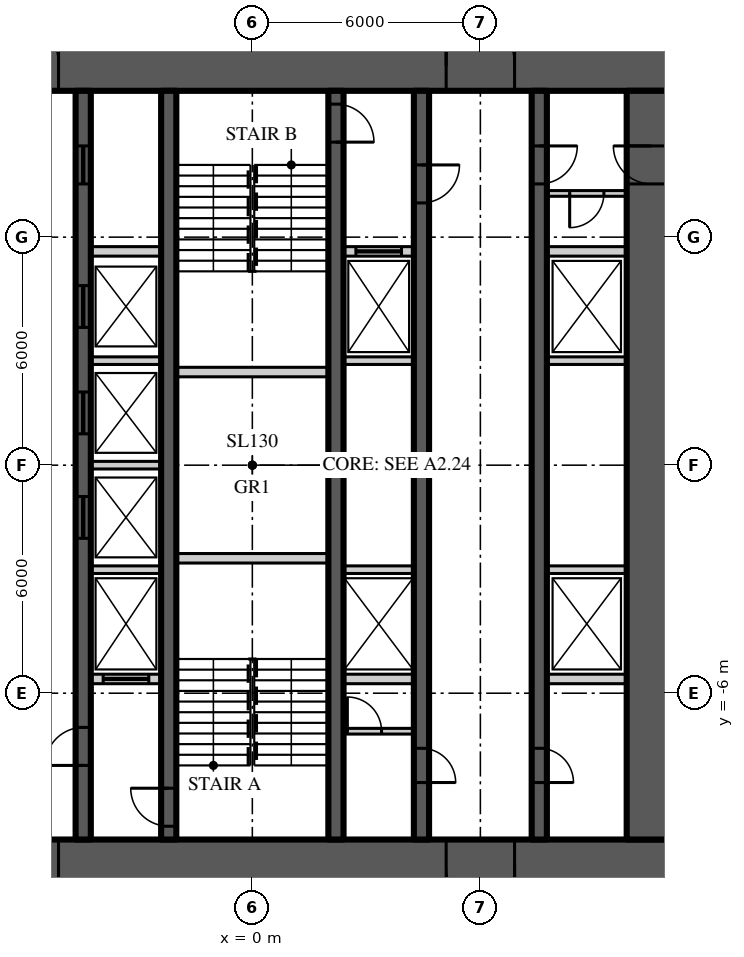
"""IFC4 building model, lengths in metres.
Left out: names, types, materials, properties, quantities, classifications, styles, units other than length and angle.
Written with IfcOpenShell. Run it as: python <this file> out.ifc"""

import sys

from ifc_helpers import new_model, si_unit, direction, frame, frame_2d, origin, place, context, subcontext, project, spatial, rectangle, extrude, element, fill, save


model = new_model("IFC4")
c1 = context("Model", 3, precision=1e-05, world=origin(), true_north=direction((0.0, 1.0)))
c2 = subcontext(c1, "Body", "Model", "MODEL_VIEW")
j1 = project(units=[si_unit("LENGTHUNIT", "METRE"), si_unit("PLANEANGLEUNIT", "RADIAN")], contexts=[c1])
p1 = place(None, origin())
s1 = spatial("IfcSite", under=j1, at=p1, CompositionType="ELEMENT")
p2 = place(p1, origin())
s2 = spatial("IfcBuilding", under=s1, at=p2, CompositionType="ELEMENT")
p3 = place(p2, frame((0.0, 0.0, 186.6)))
s3 = spatial("IfcBuildingStorey", under=s2, at=p3, CompositionType="ELEMENT", Elevation=186.6)
p4 = place(p3, frame((-11.15, 10.5, 0.0), z_axis=(0.0, 0.0, 1.0), x_axis=(1.0, 0.0, 0.0)))
e1 = element("IfcWall", 1, at=p4, inside=s3, PredefinedType="SHEAR", context=c2, shape_type="SweptSolid", body=[
    extrude(rectangle(XDim=22.3, YDim=1.3, at=frame_2d((11.15, 0.0))), origin(), (0.0, 0.0, 1.0), 3.9),
])
p5 = place(p4, frame((4.25, 0.0, 0.0)))
e2 = element("IfcOpeningElement", 2, at=p5, cuts=e1, PredefinedType="OPENING", context=c2, shape_type="SweptSolid", body=[
    extrude(rectangle(XDim=1.8, YDim=2.2, at=frame_2d((0.9, 1.1))), frame((0.0, 0.66, 0.0), z_axis=(0.0, -1.0, 0.0), x_axis=(1.0, 0.0, 0.0)), (0.0, 0.0, 1.0), 1.32),
])
p6 = place(p4, frame((16.25, 0.0, 0.0)))
e3 = element("IfcOpeningElement", 3, at=p6, cuts=e1, PredefinedType="OPENING", context=c2, shape_type="SweptSolid", body=[
    extrude(rectangle(XDim=1.8, YDim=2.2, at=frame_2d((0.9, 1.1))), frame((0.0, 0.66, 0.0), z_axis=(0.0, -1.0, 0.0), x_axis=(1.0, 0.0, 0.0)), (0.0, 0.0, 1.0), 1.32),
])
p7 = place(p3, frame((11.15, -10.5, 0.0), z_axis=(0.0, 0.0, 1.0), x_axis=(-1.0, 0.0, 0.0)))
e4 = element("IfcWall", 4, at=p7, inside=s3, PredefinedType="SHEAR", context=c2, shape_type="SweptSolid", body=[
    extrude(rectangle(XDim=22.3, YDim=1.3, at=frame_2d((11.15, 0.0))), origin(), (0.0, 0.0, 1.0), 3.9),
])
p8 = place(p7, frame((16.25, 0.0, 0.0)))
e5 = element("IfcOpeningElement", 5, at=p8, cuts=e4, PredefinedType="OPENING", context=c2, shape_type="SweptSolid", body=[
    extrude(rectangle(XDim=1.8, YDim=2.2, at=frame_2d((0.9, 1.1))), frame((0.0, 0.66, 0.0), z_axis=(0.0, -1.0, 0.0), x_axis=(1.0, 0.0, 0.0)), (0.0, 0.0, 1.0), 1.32),
])
p9 = place(p7, frame((4.25, 0.0, 0.0)))
e6 = element("IfcOpeningElement", 6, at=p9, cuts=e4, PredefinedType="OPENING", context=c2, shape_type="SweptSolid", body=[
    extrude(rectangle(XDim=1.8, YDim=2.2, at=frame_2d((0.9, 1.1))), frame((0.0, 0.66, 0.0), z_axis=(0.0, -1.0, 0.0), x_axis=(1.0, 0.0, 0.0)), (0.0, 0.0, 1.0), 1.32),
])
p10 = place(p3, frame((10.5, -9.85, 0.0), z_axis=(0.0, 0.0, 1.0), x_axis=(0.0, 1.0, 0.0)))
e7 = element("IfcWall", 7, at=p10, inside=s3, PredefinedType="SHEAR", context=c2, shape_type="SweptSolid", body=[
    extrude(rectangle(XDim=19.7, YDim=1.3, at=frame_2d((9.85, 0.0))), origin(), (0.0, 0.0, 1.0), 3.9),
])
p11 = place(p10, frame((17.25, 0.0, 0.0)))
e8 = element("IfcOpeningElement", 8, at=p11, cuts=e7, PredefinedType="OPENING", context=c2, shape_type="SweptSolid", body=[
    extrude(rectangle(XDim=1.0, YDim=2.2, at=frame_2d((0.5, 1.1))), frame((0.0, 0.66, 0.0), z_axis=(0.0, -1.0, 0.0), x_axis=(1.0, 0.0, 0.0)), (0.0, 0.0, 1.0), 1.32),
])
p12 = place(p3, frame((7.55, 9.85, 0.0), z_axis=(0.0, 0.0, 1.0), x_axis=(0.0, -1.0, 0.0)))
e9 = element("IfcWall", 9, at=p12, inside=s3, PredefinedType="SHEAR", context=c2, shape_type="SweptSolid", body=[
    extrude(rectangle(XDim=19.7, YDim=0.4, at=frame_2d((9.85, 0.0))), origin(), (0.0, 0.0, 1.0), 3.9),
])
p13 = place(p12, frame((1.45, 0.0, 0.0)))
e10 = element("IfcOpeningElement", 10, at=p13, cuts=e9, PredefinedType="OPENING", context=c2, shape_type="SweptSolid", body=[
    extrude(rectangle(XDim=1.0, YDim=2.2, at=frame_2d((0.5, 1.1))), frame((0.0, 0.21, 0.0), z_axis=(0.0, -1.0, 0.0), x_axis=(1.0, 0.0, 0.0)), (0.0, 0.0, 1.0), 0.42),
])
p14 = place(p12, frame((17.3, 0.0, 0.0)))
e11 = element("IfcOpeningElement", 11, at=p14, cuts=e9, PredefinedType="OPENING", context=c2, shape_type="SweptSolid", body=[
    extrude(rectangle(XDim=0.9, YDim=2.1, at=frame_2d((0.45, 1.05))), frame((0.0, 0.21, 0.0), z_axis=(0.0, -1.0, 0.0), x_axis=(1.0, 0.0, 0.0)), (0.0, 0.0, 1.0), 0.42),
])
p15 = place(p3, frame((-4.45, -9.85, 0.0), z_axis=(0.0, 0.0, 1.0), x_axis=(0.0, 1.0, 0.0)))
e12 = element("IfcWall", 12, at=p15, inside=s3, PredefinedType="SHEAR", context=c2, shape_type="SweptSolid", body=[
    extrude(rectangle(XDim=19.7, YDim=0.4, at=frame_2d((9.85, 0.0))), origin(), (0.0, 0.0, 1.0), 3.9),
])
p16 = place(p15, frame((1.95, 0.0, 0.0)))
e13 = element("IfcOpeningElement", 13, at=p16, cuts=e12, PredefinedType="OPENING", context=c2, shape_type="SweptSolid", body=[
    extrude(rectangle(XDim=1.0, YDim=2.2, at=frame_2d((0.5, 1.1))), frame((0.0, 0.21, 0.0), z_axis=(0.0, -1.0, 0.0), x_axis=(1.0, 0.0, 0.0)), (0.0, 0.0, 1.0), 0.42),
])
p17 = place(p15, frame((17.25, 0.0, 0.0)))
e14 = element("IfcOpeningElement", 14, at=p17, cuts=e12, PredefinedType="OPENING", context=c2, shape_type="SweptSolid", body=[
    extrude(rectangle(XDim=1.0, YDim=2.1, at=frame_2d((0.5, 1.05))), frame((0.0, 0.21, 0.0), z_axis=(0.0, -1.0, 0.0), x_axis=(1.0, 0.0, 0.0)), (0.0, 0.0, 1.0), 0.42),
])
p18 = place(p15, frame((7.925, 0.0, 0.0)))
e15 = element("IfcOpeningElement", 15, at=p18, cuts=e12, PredefinedType="OPENING", context=c2, shape_type="SweptSolid", body=[
    extrude(rectangle(XDim=1.1, YDim=2.2, at=frame_2d((0.55, 1.1))), frame((0.0, 0.21, 0.0), z_axis=(0.0, -1.0, 0.0), x_axis=(1.0, 0.0, 0.0)), (0.0, 0.0, 1.0), 0.42),
])
p19 = place(p15, frame((10.675, 0.0, 0.0)))
e16 = element("IfcOpeningElement", 16, at=p19, cuts=e12, PredefinedType="OPENING", context=c2, shape_type="SweptSolid", body=[
    extrude(rectangle(XDim=1.1, YDim=2.2, at=frame_2d((0.55, 1.1))), frame((0.0, 0.21, 0.0), z_axis=(0.0, -1.0, 0.0), x_axis=(1.0, 0.0, 0.0)), (0.0, 0.0, 1.0), 0.42),
])
p20 = place(p15, frame((13.475, 0.0, 0.0)))
e17 = element("IfcOpeningElement", 17, at=p20, cuts=e12, PredefinedType="OPENING", context=c2, shape_type="SweptSolid", body=[
    extrude(rectangle(XDim=1.1, YDim=2.2, at=frame_2d((0.55, 1.1))), frame((0.0, 0.21, 0.0), z_axis=(0.0, -1.0, 0.0), x_axis=(1.0, 0.0, 0.0)), (0.0, 0.0, 1.0), 0.42),
])
p21 = place(p3, frame((4.45, 9.85, 0.0), z_axis=(0.0, 0.0, 1.0), x_axis=(0.0, -1.0, 0.0)))
e18 = element("IfcWall", 18, at=p21, inside=s3, PredefinedType="SHEAR", context=c2, shape_type="SweptSolid", body=[
    extrude(rectangle(XDim=19.7, YDim=0.4, at=frame_2d((9.85, 0.0))), origin(), (0.0, 0.0, 1.0), 3.9),
])
p22 = place(p21, frame((1.95, 0.0, 0.0)))
e19 = element("IfcOpeningElement", 19, at=p22, cuts=e18, PredefinedType="OPENING", context=c2, shape_type="SweptSolid", body=[
    extrude(rectangle(XDim=1.0, YDim=2.2, at=frame_2d((0.5, 1.1))), frame((0.0, 0.21, 0.0), z_axis=(0.0, -1.0, 0.0), x_axis=(1.0, 0.0, 0.0)), (0.0, 0.0, 1.0), 0.42),
])
p23 = place(p21, frame((17.3, 0.0, 0.0)))
e20 = element("IfcOpeningElement", 20, at=p23, cuts=e18, PredefinedType="OPENING", context=c2, shape_type="SweptSolid", body=[
    extrude(rectangle(XDim=0.9, YDim=2.1, at=frame_2d((0.45, 1.05))), frame((0.0, 0.21, 0.0), z_axis=(0.0, -1.0, 0.0), x_axis=(1.0, 0.0, 0.0)), (0.0, 0.0, 1.0), 0.42),
])
p24 = place(p3, frame((-2.2, -9.85, 0.0), z_axis=(0.0, 0.0, 1.0), x_axis=(0.0, 1.0, 0.0)))
e21 = element("IfcWall", 21, at=p24, inside=s3, PredefinedType="SHEAR", context=c2, shape_type="SweptSolid", body=[
    extrude(rectangle(XDim=19.7, YDim=0.4, at=frame_2d((9.85, 0.0))), origin(), (0.0, 0.0, 1.0), 3.9),
])
p25 = place(p24, frame((0.35, 0.0, 0.0)))
e22 = element("IfcOpeningElement", 22, at=p25, cuts=e21, PredefinedType="OPENING", context=c2, shape_type="SweptSolid", body=[
    extrude(rectangle(XDim=1.0, YDim=2.2, at=frame_2d((0.5, 1.1))), frame((0.0, 0.21, 0.0), z_axis=(0.0, -1.0, 0.0), x_axis=(1.0, 0.0, 0.0)), (0.0, 0.0, 1.0), 0.42),
])
p26 = place(p3, frame((2.2, 9.85, 0.0), z_axis=(0.0, 0.0, 1.0), x_axis=(0.0, -1.0, 0.0)))
e23 = element("IfcWall", 23, at=p26, inside=s3, PredefinedType="SHEAR", context=c2, shape_type="SweptSolid", body=[
    extrude(rectangle(XDim=19.7, YDim=0.4, at=frame_2d((9.85, 0.0))), origin(), (0.0, 0.0, 1.0), 3.9),
])
p27 = place(p26, frame((0.35, 0.0, 0.0)))
e24 = element("IfcOpeningElement", 24, at=p27, cuts=e23, PredefinedType="OPENING", context=c2, shape_type="SweptSolid", body=[
    extrude(rectangle(XDim=1.0, YDim=2.2, at=frame_2d((0.5, 1.1))), frame((0.0, 0.21, 0.0), z_axis=(0.0, -1.0, 0.0), x_axis=(1.0, 0.0, 0.0)), (0.0, 0.0, 1.0), 0.42),
])
p28 = place(p3, frame((-4.25, 5.625, 0.0), z_axis=(0.0, 0.0, 1.0), x_axis=(1.0, 0.0, 0.0)))
e25 = element("IfcWall", 25, at=p28, inside=s3, PredefinedType="SOLIDWALL", context=c2, shape_type="SweptSolid", body=[
    extrude(rectangle(XDim=1.85, YDim=0.25, at=frame_2d((0.925, 0.0))), origin(), (0.0, 0.0, 1.0), 3.7),
])
p29 = place(p3, frame((2.4, 5.625, 0.0), z_axis=(0.0, 0.0, 1.0), x_axis=(1.0, 0.0, 0.0)))
e26 = element("IfcWall", 26, at=p29, inside=s3, PredefinedType="SOLIDWALL", context=c2, shape_type="SweptSolid", body=[
    extrude(rectangle(XDim=1.85, YDim=0.25, at=frame_2d((0.925, 0.0))), origin(), (0.0, 0.0, 1.0), 3.7),
])
p30 = place(p29, frame((0.325, 0.0, 0.0)))
e27 = element("IfcOpeningElement", 27, at=p30, cuts=e26, PredefinedType="OPENING", context=c2, shape_type="SweptSolid", body=[
    extrude(rectangle(XDim=1.2, YDim=2.2, at=frame_2d((0.6, 1.1))), frame((0.0, 0.135, 0.0), z_axis=(0.0, -1.0, 0.0), x_axis=(1.0, 0.0, 0.0)), (0.0, 0.0, 1.0), 0.27),
])
p31 = place(p3, frame((7.75, 5.625, 0.0), z_axis=(0.0, 0.0, 1.0), x_axis=(1.0, 0.0, 0.0)))
e28 = element("IfcWall", 28, at=p31, inside=s3, PredefinedType="SOLIDWALL", context=c2, shape_type="SweptSolid", body=[
    extrude(rectangle(XDim=2.1, YDim=0.25, at=frame_2d((1.05, 0.0))), origin(), (0.0, 0.0, 1.0), 3.7),
])
p32 = place(p3, frame((-4.25, -5.625, 0.0), z_axis=(0.0, 0.0, 1.0), x_axis=(1.0, 0.0, 0.0)))
e29 = element("IfcWall", 29, at=p32, inside=s3, PredefinedType="SOLIDWALL", context=c2, shape_type="SweptSolid", body=[
    extrude(rectangle(XDim=1.85, YDim=0.25, at=frame_2d((0.925, 0.0))), origin(), (0.0, 0.0, 1.0), 3.7),
])
p33 = place(p32, frame((0.325, 0.0, 0.0)))
e30 = element("IfcOpeningElement", 30, at=p33, cuts=e29, PredefinedType="OPENING", context=c2, shape_type="SweptSolid", body=[
    extrude(rectangle(XDim=1.2, YDim=2.2, at=frame_2d((0.6, 1.1))), frame((0.0, 0.135, 0.0), z_axis=(0.0, -1.0, 0.0), x_axis=(1.0, 0.0, 0.0)), (0.0, 0.0, 1.0), 0.27),
])
p34 = place(p3, frame((2.4, -5.625, 0.0), z_axis=(0.0, 0.0, 1.0), x_axis=(1.0, 0.0, 0.0)))
e31 = element("IfcWall", 31, at=p34, inside=s3, PredefinedType="SOLIDWALL", context=c2, shape_type="SweptSolid", body=[
    extrude(rectangle(XDim=1.85, YDim=0.25, at=frame_2d((0.925, 0.0))), origin(), (0.0, 0.0, 1.0), 3.7),
])
p35 = place(p3, frame((7.75, -5.625, 0.0), z_axis=(0.0, 0.0, 1.0), x_axis=(1.0, 0.0, 0.0)))
e32 = element("IfcWall", 32, at=p35, inside=s3, PredefinedType="SOLIDWALL", context=c2, shape_type="SweptSolid", body=[
    extrude(rectangle(XDim=2.1, YDim=0.25, at=frame_2d((1.05, 0.0))), origin(), (0.0, 0.0, 1.0), 3.7),
])
for number, where, z_axis, x_axis in (
    (33, (-2.0, -2.45, 0.0), (0.0, 0.0, 1.0), (1.0, 0.0, 0.0)),
    (34, (-2.0, 2.45, 0.0), (0.0, 0.0, 1.0), (1.0, 0.0, 0.0)),
):
    element("IfcWall", number, at=place(p3, frame(where, z_axis=z_axis, x_axis=x_axis)), inside=s3, PredefinedType="SOLIDWALL", context=c2, shape_type="SweptSolid", body=[
        extrude(rectangle(XDim=4.0, YDim=0.25, at=frame_2d((2.0, 0.0))), origin(), (0.0, 0.0, 1.0), 3.7),
    ])
for number, where, z_axis, x_axis in (
    (35, (-4.25, -2.75, 0.0), (0.0, 0.0, 1.0), (1.0, 0.0, 0.0)),
    (36, (2.4, -2.75, 0.0), (0.0, 0.0, 1.0), (1.0, 0.0, 0.0)),
):
    element("IfcWall", number, at=place(p3, frame(where, z_axis=z_axis, x_axis=x_axis)), inside=s3, PredefinedType="SOLIDWALL", context=c2, shape_type="SweptSolid", body=[
        extrude(rectangle(XDim=1.85, YDim=0.2, at=frame_2d((0.925, 0.0))), origin(), (0.0, 0.0, 1.0), 3.7),
    ])
p36 = place(p3, frame((7.75, -2.75, 0.0), z_axis=(0.0, 0.0, 1.0), x_axis=(1.0, 0.0, 0.0)))
e37 = element("IfcWall", 37, at=p36, inside=s3, PredefinedType="SOLIDWALL", context=c2, shape_type="SweptSolid", body=[
    extrude(rectangle(XDim=2.1, YDim=0.2, at=frame_2d((1.05, 0.0))), origin(), (0.0, 0.0, 1.0), 3.7),
])
for number, where, z_axis, x_axis in (
    (38, (-4.25, 0.0, 0.0), (0.0, 0.0, 1.0), (1.0, 0.0, 0.0)),
    (39, (-4.25, 2.75, 0.0), (0.0, 0.0, 1.0), (1.0, 0.0, 0.0)),
    (40, (2.4, 2.75, 0.0), (0.0, 0.0, 1.0), (1.0, 0.0, 0.0)),
):
    element("IfcWall", number, at=place(p3, frame(where, z_axis=z_axis, x_axis=x_axis)), inside=s3, PredefinedType="SOLIDWALL", context=c2, shape_type="SweptSolid", body=[
        extrude(rectangle(XDim=1.85, YDim=0.2, at=frame_2d((0.925, 0.0))), origin(), (0.0, 0.0, 1.0), 3.7),
    ])
p37 = place(p3, frame((7.75, 2.75, 0.0), z_axis=(0.0, 0.0, 1.0), x_axis=(1.0, 0.0, 0.0)))
e41 = element("IfcWall", 41, at=p37, inside=s3, PredefinedType="SOLIDWALL", context=c2, shape_type="SweptSolid", body=[
    extrude(rectangle(XDim=2.1, YDim=0.2, at=frame_2d((1.05, 0.0))), origin(), (0.0, 0.0, 1.0), 3.7),
])
p38 = place(p3, frame((2.4, -7.0, 0.0), z_axis=(0.0, 0.0, 1.0), x_axis=(1.0, 0.0, 0.0)))
e42 = element("IfcWall", 42, at=p38, inside=s3, PredefinedType="SOLIDWALL", context=c2, shape_type="SweptSolid", body=[
    extrude(rectangle(XDim=1.85, YDim=0.15, at=frame_2d((0.925, 0.0))), origin(), (0.0, 0.0, 1.0), 3.77),
])
p39 = place(p38, frame((0.1, 0.0, 0.0)))
e43 = element("IfcOpeningElement", 43, at=p39, cuts=e42, PredefinedType="OPENING", context=c2, shape_type="SweptSolid", body=[
    extrude(rectangle(XDim=0.9, YDim=2.1, at=frame_2d((0.45, 1.05))), frame((0.0, 0.085, 0.0), z_axis=(0.0, -1.0, 0.0), x_axis=(1.0, 0.0, 0.0)), (0.0, 0.0, 1.0), 0.17),
])
p40 = place(p3, frame((9.85, 7.15, 0.0), z_axis=(0.0, 0.0, 1.0), x_axis=(-1.0, 0.0, 0.0)))
e44 = element("IfcWall", 44, at=p40, inside=s3, PredefinedType="SOLIDWALL", context=c2, shape_type="SweptSolid", body=[
    extrude(rectangle(XDim=2.1, YDim=0.15, at=frame_2d((1.05, 0.0))), origin(), (0.0, 0.0, 1.0), 3.77),
])
p41 = place(p40, frame((0.6, 0.0, 0.0)))
e45 = element("IfcOpeningElement", 45, at=p41, cuts=e44, PredefinedType="OPENING", context=c2, shape_type="SweptSolid", body=[
    extrude(rectangle(XDim=0.9, YDim=2.1, at=frame_2d((0.45, 1.05))), frame((0.0, 0.085, 0.0), z_axis=(0.0, -1.0, 0.0), x_axis=(1.0, 0.0, 0.0)), (0.0, 0.0, 1.0), 0.17),
])
p42 = place(p5, origin())
e46 = element("IfcDoor", 46, at=p42, inside=s3, OperationType="DOUBLE_DOOR_DOUBLE_SWING", PredefinedType="DOOR", context=c2, shape_type="SweptSolid", body=[
    extrude(rectangle(XDim=1.8, YDim=2.2, at=frame_2d((0.9, 1.1))), frame((0.0, 0.025, 0.0), z_axis=(0.0, -1.0, 0.0), x_axis=(1.0, 0.0, 0.0)), (0.0, 0.0, 1.0), 0.05),
])
fill(e2, e46)
p43 = place(p8, origin())
e47 = element("IfcDoor", 47, at=p43, inside=s3, OperationType="DOUBLE_DOOR_DOUBLE_SWING", PredefinedType="DOOR", context=c2, shape_type="SweptSolid", body=[
    extrude(rectangle(XDim=1.8, YDim=2.2, at=frame_2d((0.9, 1.1))), frame((0.0, 0.025, 0.0), z_axis=(0.0, -1.0, 0.0), x_axis=(1.0, 0.0, 0.0)), (0.0, 0.0, 1.0), 0.05),
])
fill(e5, e47)
p44 = place(p6, origin())
e48 = element("IfcDoor", 48, at=p44, inside=s3, OperationType="DOUBLE_DOOR_DOUBLE_SWING", PredefinedType="DOOR", context=c2, shape_type="SweptSolid", body=[
    extrude(rectangle(XDim=1.8, YDim=2.2, at=frame_2d((0.9, 1.1))), frame((0.0, 0.025, 0.0), z_axis=(0.0, -1.0, 0.0), x_axis=(1.0, 0.0, 0.0)), (0.0, 0.0, 1.0), 0.05),
])
fill(e3, e48)
p45 = place(p9, origin())
e49 = element("IfcDoor", 49, at=p45, inside=s3, OperationType="DOUBLE_DOOR_DOUBLE_SWING", PredefinedType="DOOR", context=c2, shape_type="SweptSolid", body=[
    extrude(rectangle(XDim=1.8, YDim=2.2, at=frame_2d((0.9, 1.1))), frame((0.0, 0.025, 0.0), z_axis=(0.0, -1.0, 0.0), x_axis=(1.0, 0.0, 0.0)), (0.0, 0.0, 1.0), 0.05),
])
fill(e6, e49)
p46 = place(p13, origin())
e50 = element("IfcDoor", 50, at=p46, inside=s3, OperationType="SINGLE_SWING_LEFT", PredefinedType="DOOR", context=c2, shape_type="SweptSolid", body=[
    extrude(rectangle(XDim=1.0, YDim=2.2, at=frame_2d((0.5, 1.1))), frame((0.0, 0.025, 0.0), z_axis=(0.0, -1.0, 0.0), x_axis=(1.0, 0.0, 0.0)), (0.0, 0.0, 1.0), 0.05),
])
fill(e10, e50)
p47 = place(p11, origin())
e51 = element("IfcDoor", 51, at=p47, inside=s3, OperationType="SINGLE_SWING_RIGHT", PredefinedType="DOOR", context=c2, shape_type="SweptSolid", body=[
    extrude(rectangle(XDim=1.0, YDim=2.2, at=frame_2d((0.5, 1.1))), frame((0.0, 0.025, 0.0), z_axis=(0.0, -1.0, 0.0), x_axis=(1.0, 0.0, 0.0)), (0.0, 0.0, 1.0), 0.05),
])
fill(e8, e51)
p48 = place(p16, origin())
e52 = element("IfcDoor", 52, at=p48, inside=s3, OperationType="SINGLE_SWING_LEFT", PredefinedType="DOOR", context=c2, shape_type="SweptSolid", body=[
    extrude(rectangle(XDim=1.0, YDim=2.2, at=frame_2d((0.5, 1.1))), frame((0.0, 0.025, 0.0), z_axis=(0.0, -1.0, 0.0), x_axis=(1.0, 0.0, 0.0)), (0.0, 0.0, 1.0), 0.05),
])
fill(e13, e52)
p49 = place(p25, origin())
e53 = element("IfcDoor", 53, at=p49, inside=s3, OperationType="SINGLE_SWING_RIGHT", PredefinedType="DOOR", context=c2, shape_type="SweptSolid", body=[
    extrude(rectangle(XDim=1.0, YDim=2.2, at=frame_2d((0.5, 1.1))), frame((0.0, 0.025, 0.0), z_axis=(0.0, -1.0, 0.0), x_axis=(1.0, 0.0, 0.0)), (0.0, 0.0, 1.0), 0.05),
])
fill(e22, e53)
p50 = place(p22, origin())
e54 = element("IfcDoor", 54, at=p50, inside=s3, OperationType="SINGLE_SWING_LEFT", PredefinedType="DOOR", context=c2, shape_type="SweptSolid", body=[
    extrude(rectangle(XDim=1.0, YDim=2.2, at=frame_2d((0.5, 1.1))), frame((0.0, 0.025, 0.0), z_axis=(0.0, -1.0, 0.0), x_axis=(1.0, 0.0, 0.0)), (0.0, 0.0, 1.0), 0.05),
])
fill(e19, e54)
p51 = place(p27, origin())
e55 = element("IfcDoor", 55, at=p51, inside=s3, OperationType="SINGLE_SWING_RIGHT", PredefinedType="DOOR", context=c2, shape_type="SweptSolid", body=[
    extrude(rectangle(XDim=1.0, YDim=2.2, at=frame_2d((0.5, 1.1))), frame((0.0, 0.025, 0.0), z_axis=(0.0, -1.0, 0.0), x_axis=(1.0, 0.0, 0.0)), (0.0, 0.0, 1.0), 0.05),
])
fill(e24, e55)
p52 = place(p17, origin())
e56 = element("IfcDoor", 56, at=p52, inside=s3, OperationType="SLIDING_TO_LEFT", PredefinedType="DOOR", context=c2, shape_type="SweptSolid", body=[
    extrude(rectangle(XDim=1.0, YDim=2.1, at=frame_2d((0.5, 1.05))), frame((0.0, 0.025, 0.0), z_axis=(0.0, -1.0, 0.0), x_axis=(1.0, 0.0, 0.0)), (0.0, 0.0, 1.0), 0.05),
])
fill(e14, e56)
p53 = place(p14, origin())
e57 = element("IfcDoor", 57, at=p53, inside=s3, OperationType="SINGLE_SWING_RIGHT", PredefinedType="DOOR", context=c2, shape_type="SweptSolid", body=[
    extrude(rectangle(XDim=0.9, YDim=2.1, at=frame_2d((0.45, 1.05))), frame((0.0, 0.025, 0.0), z_axis=(0.0, -1.0, 0.0), x_axis=(1.0, 0.0, 0.0)), (0.0, 0.0, 1.0), 0.05),
])
fill(e11, e57)
p54 = place(p23, origin())
e58 = element("IfcDoor", 58, at=p54, inside=s3, OperationType="SINGLE_SWING_RIGHT", PredefinedType="DOOR", context=c2, shape_type="SweptSolid", body=[
    extrude(rectangle(XDim=0.9, YDim=2.1, at=frame_2d((0.45, 1.05))), frame((0.0, 0.025, 0.0), z_axis=(0.0, -1.0, 0.0), x_axis=(1.0, 0.0, 0.0)), (0.0, 0.0, 1.0), 0.05),
])
fill(e20, e58)
p55 = place(p18, origin())
e59 = element("IfcDoor", 59, at=p55, inside=s3, OperationType="SLIDING_TO_LEFT", PredefinedType="DOOR", context=c2, shape_type="SweptSolid", body=[
    extrude(rectangle(XDim=1.1, YDim=2.2, at=frame_2d((0.55, 1.1))), frame((0.0, 0.025, 0.0), z_axis=(0.0, -1.0, 0.0), x_axis=(1.0, 0.0, 0.0)), (0.0, 0.0, 1.0), 0.05),
])
fill(e15, e59)
p56 = place(p19, origin())
e60 = element("IfcDoor", 60, at=p56, inside=s3, OperationType="SLIDING_TO_LEFT", PredefinedType="DOOR", context=c2, shape_type="SweptSolid", body=[
    extrude(rectangle(XDim=1.1, YDim=2.2, at=frame_2d((0.55, 1.1))), frame((0.0, 0.025, 0.0), z_axis=(0.0, -1.0, 0.0), x_axis=(1.0, 0.0, 0.0)), (0.0, 0.0, 1.0), 0.05),
])
fill(e16, e60)
p57 = place(p20, origin())
e61 = element("IfcDoor", 61, at=p57, inside=s3, OperationType="SLIDING_TO_LEFT", PredefinedType="DOOR", context=c2, shape_type="SweptSolid", body=[
    extrude(rectangle(XDim=1.1, YDim=2.2, at=frame_2d((0.55, 1.1))), frame((0.0, 0.025, 0.0), z_axis=(0.0, -1.0, 0.0), x_axis=(1.0, 0.0, 0.0)), (0.0, 0.0, 1.0), 0.05),
])
fill(e17, e61)
p58 = place(p33, origin())
e62 = element("IfcDoor", 62, at=p58, inside=s3, OperationType="SLIDING_TO_LEFT", PredefinedType="DOOR", context=c2, shape_type="SweptSolid", body=[
    extrude(rectangle(XDim=1.2, YDim=2.2, at=frame_2d((0.6, 1.1))), frame((0.0, 0.025, 0.0), z_axis=(0.0, -1.0, 0.0), x_axis=(1.0, 0.0, 0.0)), (0.0, 0.0, 1.0), 0.05),
])
fill(e30, e62)
p59 = place(p30, origin())
e63 = element("IfcDoor", 63, at=p59, inside=s3, OperationType="SLIDING_TO_LEFT", PredefinedType="DOOR", context=c2, shape_type="SweptSolid", body=[
    extrude(rectangle(XDim=1.2, YDim=2.2, at=frame_2d((0.6, 1.1))), frame((0.0, 0.025, 0.0), z_axis=(0.0, -1.0, 0.0), x_axis=(1.0, 0.0, 0.0)), (0.0, 0.0, 1.0), 0.05),
])
fill(e27, e63)
p60 = place(p39, origin())
e64 = element("IfcDoor", 64, at=p60, inside=s3, OperationType="SINGLE_SWING_LEFT", PredefinedType="DOOR", context=c2, shape_type="SweptSolid", body=[
    extrude(rectangle(XDim=0.9, YDim=2.1, at=frame_2d((0.45, 1.05))), frame((0.0, 0.025, 0.0), z_axis=(0.0, -1.0, 0.0), x_axis=(1.0, 0.0, 0.0)), (0.0, 0.0, 1.0), 0.05),
])
fill(e43, e64)
p61 = place(p41, origin())
e65 = element("IfcDoor", 65, at=p61, inside=s3, OperationType="SINGLE_SWING_RIGHT", PredefinedType="DOOR", context=c2, shape_type="SweptSolid", body=[
    extrude(rectangle(XDim=0.9, YDim=2.1, at=frame_2d((0.45, 1.05))), frame((0.0, 0.025, 0.0), z_axis=(0.0, -1.0, 0.0), x_axis=(1.0, 0.0, 0.0)), (0.0, 0.0, 1.0), 0.05),
])
fill(e45, e65)
save(model, sys.argv[1])
